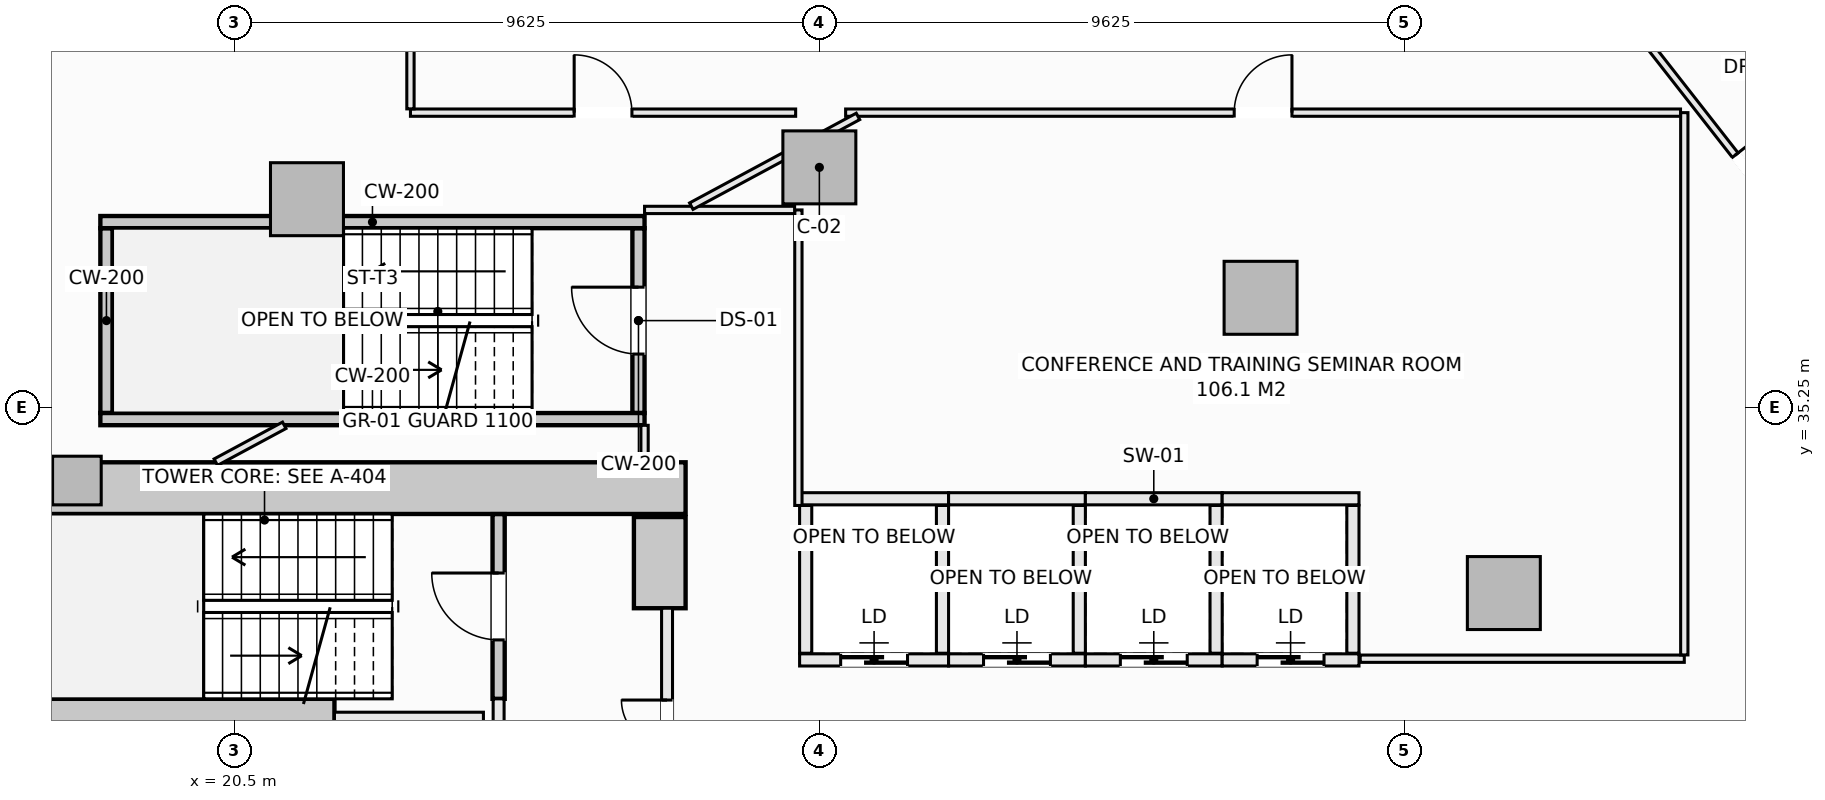
"""IFC4 building model, lengths in metres.
Left out: names, types, materials, properties, quantities, classifications, styles, units other than length and angle.
Written with IfcOpenShell. Run it as: python <this file> out.ifc"""

import sys

from ifc_helpers import new_model, si_unit, direction, frame, frame_2d, origin, origin_2d, place, context, subcontext, project, spatial, rectangle, extrude, element, fill, save


model = new_model("IFC4")
c1 = context("Model", 3, precision=1e-05, world=origin(), true_north=direction((0.0, 1.0)))
c2 = subcontext(c1, "Body", "Model", "MODEL_VIEW")
j1 = project(units=[si_unit("LENGTHUNIT", "METRE"), si_unit("PLANEANGLEUNIT", "RADIAN")], contexts=[c1])
p1 = place(None, origin())
s1 = spatial("IfcSite", under=j1, at=p1, CompositionType="ELEMENT")
p2 = place(p1, origin())
s2 = spatial("IfcBuilding", under=s1, at=p2, CompositionType="ELEMENT")
p3 = place(p2, frame((0.0, 0.0, 38.05)))
s3 = spatial("IfcBuildingStorey", under=s2, at=p3, CompositionType="ELEMENT", Elevation=38.05)
p4 = place(p3, frame((14.075, 33.925, -0.28), z_axis=(0.0, 0.0, 1.0), x_axis=(1.0, 0.0, 0.0)))
e1 = element("IfcWall", 1, at=p4, inside=s3, PredefinedType="SHEAR", context=c2, shape_type="SweptSolid", body=[
    extrude(rectangle(XDim=13.85, YDim=0.85, at=frame_2d((6.925, 0.0))), origin(), (0.0, 0.0, 1.0), 3.85),
])
p5 = place(p3, frame((27.5, 31.95, -0.28), z_axis=(0.0, 0.0, 1.0), x_axis=(0.0, 1.0, 0.0)))
e2 = element("IfcWall", 2, at=p5, inside=s3, PredefinedType="SHEAR", context=c2, shape_type="SweptSolid", body=[
    extrude(rectangle(XDim=1.5, YDim=0.85, at=frame_2d((0.75, 0.0))), origin(), (0.0, 0.0, 1.0), 3.85),
])
p6 = place(p3, frame((14.85, 30.25, -0.28), z_axis=(0.0, 0.0, 1.0), x_axis=(1.0, 0.0, 0.0)))
e3 = element("IfcWall", 3, at=p6, inside=s3, PredefinedType="SHEAR", context=c2, shape_type="SweptSolid", body=[
    extrude(rectangle(XDim=7.3, YDim=0.42, at=frame_2d((3.65, 0.0))), origin(), (0.0, 0.0, 1.0), 3.85),
])
for number, where, z_axis, x_axis in (
    (4, (41.382, 32.199, -0.28), (0.0, 0.0, 1.0), (1.0, 0.0, 0.0)),
    (5, (37.382, 37.055, -0.28), (0.0, 0.0, 1.0), (1.0, 0.0, 0.0)),
    (6, (30.125, 39.2, -0.28), (0.0, 0.0, 1.0), (1.0, 0.0, 0.0)),
    (7, (21.698, 38.677, -0.28), (0.0, 0.0, 1.0), (1.0, 0.0, 0.0)),
):
    element("IfcColumn", number, at=place(p3, frame(where, z_axis=z_axis, x_axis=x_axis)), inside=s3, PredefinedType="COLUMN", context=c2, shape_type="SweptSolid", body=[
        extrude(rectangle(XDim=1.2, YDim=1.2, at=origin_2d()), origin(), (0.0, 0.0, 1.0), 3.85),
    ])
p7 = place(p3, frame((17.914, 34.05, -0.28), z_axis=(0.0, 0.0, 1.0), x_axis=(1.0, 0.0, 0.0)))
e8 = element("IfcColumn", 8, at=p7, inside=s3, PredefinedType="PILASTER", context=c2, shape_type="SweptSolid", body=[
    extrude(rectangle(XDim=0.8, YDim=0.8, at=origin_2d()), origin(), (0.0, 0.0, 1.0), 3.85),
])
p8 = place(p3, frame((24.85, 30.46, -0.28), z_axis=(0.0, 0.0, 1.0), x_axis=(0.0, 1.0, 0.0)))
e9 = element("IfcWall", 9, at=p8, inside=s3, PredefinedType="SHEAR", context=c2, shape_type="SweptSolid", body=[
    extrude(rectangle(XDim=3.038, YDim=0.2, at=frame_2d((1.519, 0.0))), origin(), (0.0, 0.0, 1.0), 3.85),
])
p9 = place(p8, frame((0.969, 0.0, 0.28)))
e10 = element("IfcOpeningElement", 10, at=p9, cuts=e9, PredefinedType="OPENING", context=c2, shape_type="SweptSolid", body=[
    extrude(rectangle(XDim=1.1, YDim=2.15, at=frame_2d((0.55, 1.075))), frame((0.0, 0.11, 0.0), z_axis=(0.0, -1.0, 0.0), x_axis=(1.0, 0.0, 0.0)), (0.0, 0.0, 1.0), 0.22),
])
p10 = place(p3, frame((27.15, 35.16, -0.28), z_axis=(0.0, 0.0, 1.0), x_axis=(0.0, 1.0, 0.0)))
e11 = element("IfcWall", 11, at=p10, inside=s3, PredefinedType="SHEAR", context=c2, shape_type="SweptSolid", body=[
    extrude(rectangle(XDim=3.04, YDim=0.2, at=frame_2d((1.52, 0.0))), origin(), (0.0, 0.0, 1.0), 3.85),
])
p11 = place(p10, frame((0.97, 0.0, 0.28)))
e12 = element("IfcOpeningElement", 12, at=p11, cuts=e11, PredefinedType="OPENING", context=c2, shape_type="SweptSolid", body=[
    extrude(rectangle(XDim=1.1, YDim=2.15, at=frame_2d((0.55, 1.075))), frame((0.0, 0.11, 0.0), z_axis=(0.0, -1.0, 0.0), x_axis=(1.0, 0.0, 0.0)), (0.0, 0.0, 1.0), 0.22),
])
p12 = place(p3, frame((18.4, 35.16, -0.28), z_axis=(0.0, 0.0, 1.0), x_axis=(0.0, 1.0, 0.0)))
e13 = element("IfcWall", 13, at=p12, inside=s3, PredefinedType="SHEAR", context=c2, shape_type="SweptSolid", body=[
    extrude(rectangle(XDim=3.04, YDim=0.2, at=frame_2d((1.52, 0.0))), origin(), (0.0, 0.0, 1.0), 3.85),
])
for number, where, z_axis, x_axis in (
    (14, (18.3, 38.3, -0.28), (0.0, 0.0, 1.0), (1.0, 0.0, 0.0)),
    (15, (18.3, 35.06, -0.28), (0.0, 0.0, 1.0), (1.0, 0.0, 0.0)),
):
    element("IfcWall", number, at=place(p3, frame(where, z_axis=z_axis, x_axis=x_axis)), inside=s3, PredefinedType="SHEAR", context=c2, shape_type="SweptSolid", body=[
        extrude(rectangle(XDim=8.95, YDim=0.2, at=frame_2d((4.475, 0.0))), origin(), (0.0, 0.0, 1.0), 3.85),
    ])
p13 = place(p3, frame((22.15, 30.14, 0.0), z_axis=(0.0, 0.0, 1.0), x_axis=(1.0, 0.0, 0.0)))
e16 = element("IfcWall", 16, at=p13, inside=s3, PredefinedType="SOLIDWALL", context=c2, shape_type="SweptSolid", body=[
    extrude(rectangle(XDim=2.45, YDim=0.2, at=frame_2d((1.225, 0.0))), origin(), (0.0, 0.0, 1.0), 3.57),
])
p14 = place(p3, frame((29.8, 33.75, 0.0), z_axis=(0.0, 0.0, 1.0), x_axis=(1.0, 0.0, 0.0)))
e17 = element("IfcWall", 17, at=p14, inside=s3, PredefinedType="SOLIDWALL", context=c2, shape_type="SweptSolid", body=[
    extrude(rectangle(XDim=2.45, YDim=0.2, at=frame_2d((1.225, 0.0))), origin(), (0.0, 0.0, 1.0), 3.57),
])
p15 = place(p3, frame((29.8, 31.1, 0.0), z_axis=(0.0, 0.0, 1.0), x_axis=(1.0, 0.0, 0.0)))
e18 = element("IfcWall", 18, at=p15, inside=s3, PredefinedType="SOLIDWALL", context=c2, shape_type="SweptSolid", body=[
    extrude(rectangle(XDim=2.45, YDim=0.2, at=frame_2d((1.225, 0.0))), origin(), (0.0, 0.0, 1.0), 3.57),
])
p16 = place(p15, frame((0.675, 0.0, 0.0)))
e19 = element("IfcOpeningElement", 19, at=p16, cuts=e18, PredefinedType="OPENING", context=c2, shape_type="SweptSolid", body=[
    extrude(rectangle(XDim=1.1, YDim=2.2, at=frame_2d((0.55, 1.1))), frame((0.0, 0.11, 0.0), z_axis=(0.0, -1.0, 0.0), x_axis=(1.0, 0.0, 0.0)), (0.0, 0.0, 1.0), 0.22),
])
for number, where, z_axis, x_axis in (
    (20, (29.9, 31.21, 0.0), (0.0, 0.0, 1.0), (0.0, 1.0, 0.0)),
    (21, (32.15, 31.21, 0.0), (0.0, 0.0, 1.0), (0.0, 1.0, 0.0)),
):
    element("IfcWall", number, at=place(p3, frame(where, z_axis=z_axis, x_axis=x_axis)), inside=s3, PredefinedType="SOLIDWALL", context=c2, shape_type="SweptSolid", body=[
        extrude(rectangle(XDim=2.43, YDim=0.2, at=frame_2d((1.215, 0.0))), origin(), (0.0, 0.0, 1.0), 3.57),
    ])
p17 = place(p3, frame((32.25, 33.75, 0.0), z_axis=(0.0, 0.0, 1.0), x_axis=(1.0, 0.0, 0.0)))
e22 = element("IfcWall", 22, at=p17, inside=s3, PredefinedType="SOLIDWALL", context=c2, shape_type="SweptSolid", body=[
    extrude(rectangle(XDim=2.25, YDim=0.2, at=frame_2d((1.125, 0.0))), origin(), (0.0, 0.0, 1.0), 3.57),
])
p18 = place(p3, frame((32.25, 31.1, 0.0), z_axis=(0.0, 0.0, 1.0), x_axis=(1.0, 0.0, 0.0)))
e23 = element("IfcWall", 23, at=p18, inside=s3, PredefinedType="SOLIDWALL", context=c2, shape_type="SweptSolid", body=[
    extrude(rectangle(XDim=2.25, YDim=0.2, at=frame_2d((1.125, 0.0))), origin(), (0.0, 0.0, 1.0), 3.57),
])
p19 = place(p18, frame((0.575, 0.0, 0.0)))
e24 = element("IfcOpeningElement", 24, at=p19, cuts=e23, PredefinedType="OPENING", context=c2, shape_type="SweptSolid", body=[
    extrude(rectangle(XDim=1.1, YDim=2.2, at=frame_2d((0.55, 1.1))), frame((0.0, 0.11, 0.0), z_axis=(0.0, -1.0, 0.0), x_axis=(1.0, 0.0, 0.0)), (0.0, 0.0, 1.0), 0.22),
])
p20 = place(p3, frame((34.4, 31.21, 0.0), z_axis=(0.0, 0.0, 1.0), x_axis=(0.0, 1.0, 0.0)))
e25 = element("IfcWall", 25, at=p20, inside=s3, PredefinedType="SOLIDWALL", context=c2, shape_type="SweptSolid", body=[
    extrude(rectangle(XDim=2.43, YDim=0.2, at=frame_2d((1.215, 0.0))), origin(), (0.0, 0.0, 1.0), 3.57),
])
p21 = place(p3, frame((34.5, 33.75, 0.0), z_axis=(0.0, 0.0, 1.0), x_axis=(1.0, 0.0, 0.0)))
e26 = element("IfcWall", 26, at=p21, inside=s3, PredefinedType="SOLIDWALL", context=c2, shape_type="SweptSolid", body=[
    extrude(rectangle(XDim=2.25, YDim=0.2, at=frame_2d((1.125, 0.0))), origin(), (0.0, 0.0, 1.0), 3.57),
])
p22 = place(p3, frame((34.5, 31.1, 0.0), z_axis=(0.0, 0.0, 1.0), x_axis=(1.0, 0.0, 0.0)))
e27 = element("IfcWall", 27, at=p22, inside=s3, PredefinedType="SOLIDWALL", context=c2, shape_type="SweptSolid", body=[
    extrude(rectangle(XDim=2.25, YDim=0.2, at=frame_2d((1.125, 0.0))), origin(), (0.0, 0.0, 1.0), 3.57),
])
p23 = place(p22, frame((0.575, 0.0, 0.0)))
e28 = element("IfcOpeningElement", 28, at=p23, cuts=e27, PredefinedType="OPENING", context=c2, shape_type="SweptSolid", body=[
    extrude(rectangle(XDim=1.1, YDim=2.2, at=frame_2d((0.55, 1.1))), frame((0.0, 0.11, 0.0), z_axis=(0.0, -1.0, 0.0), x_axis=(1.0, 0.0, 0.0)), (0.0, 0.0, 1.0), 0.22),
])
p24 = place(p3, frame((36.65, 31.21, 0.0), z_axis=(0.0, 0.0, 1.0), x_axis=(0.0, 1.0, 0.0)))
e29 = element("IfcWall", 29, at=p24, inside=s3, PredefinedType="SOLIDWALL", context=c2, shape_type="SweptSolid", body=[
    extrude(rectangle(XDim=2.43, YDim=0.2, at=frame_2d((1.215, 0.0))), origin(), (0.0, 0.0, 1.0), 3.57),
])
p25 = place(p3, frame((36.75, 33.75, 0.0), z_axis=(0.0, 0.0, 1.0), x_axis=(1.0, 0.0, 0.0)))
e30 = element("IfcWall", 30, at=p25, inside=s3, PredefinedType="SOLIDWALL", context=c2, shape_type="SweptSolid", body=[
    extrude(rectangle(XDim=2.25, YDim=0.2, at=frame_2d((1.125, 0.0))), origin(), (0.0, 0.0, 1.0), 3.57),
])
p26 = place(p3, frame((36.75, 31.1, 0.0), z_axis=(0.0, 0.0, 1.0), x_axis=(1.0, 0.0, 0.0)))
e31 = element("IfcWall", 31, at=p26, inside=s3, PredefinedType="SOLIDWALL", context=c2, shape_type="SweptSolid", body=[
    extrude(rectangle(XDim=2.25, YDim=0.2, at=frame_2d((1.125, 0.0))), origin(), (0.0, 0.0, 1.0), 3.57),
])
p27 = place(p26, frame((0.575, 0.0, 0.0)))
e32 = element("IfcOpeningElement", 32, at=p27, cuts=e31, PredefinedType="OPENING", context=c2, shape_type="SweptSolid", body=[
    extrude(rectangle(XDim=1.1, YDim=2.2, at=frame_2d((0.55, 1.1))), frame((0.0, 0.11, 0.0), z_axis=(0.0, -1.0, 0.0), x_axis=(1.0, 0.0, 0.0)), (0.0, 0.0, 1.0), 0.22),
])
p28 = place(p3, frame((38.9, 31.21, 0.0), z_axis=(0.0, 0.0, 1.0), x_axis=(0.0, 1.0, 0.0)))
e33 = element("IfcWall", 33, at=p28, inside=s3, PredefinedType="SOLIDWALL", context=c2, shape_type="SweptSolid", body=[
    extrude(rectangle(XDim=2.43, YDim=0.2, at=frame_2d((1.215, 0.0))), origin(), (0.0, 0.0, 1.0), 3.57),
])
p29 = place(p3, frame((24.85, 30.04, 0.0), z_axis=(0.0, 0.0, 1.0), x_axis=(0.0, 1.0, 0.0)))
e34 = element("IfcWall", 34, at=p29, inside=s3, PredefinedType="SOLIDWALL", context=c2, shape_type="SweptSolid", body=[
    extrude(rectangle(XDim=0.42, YDim=0.18, at=frame_2d((0.21, 0.0))), origin(), (0.0, 0.0, 1.0), 3.57),
])
p30 = place(p3, frame((27.62, 22.05, 0.0), z_axis=(0.0, 0.0, 1.0), x_axis=(0.0, 1.0, 0.0)))
e35 = element("IfcWall", 35, at=p30, inside=s3, PredefinedType="SOLIDWALL", context=c2, shape_type="SweptSolid", body=[
    extrude(rectangle(XDim=9.9, YDim=0.18, at=frame_2d((4.95, 0.0))), origin(), (0.0, 0.0, 1.0), 2.662),
])
p31 = place(p30, frame((4.475, 0.0, 0.0)))
e36 = element("IfcOpeningElement", 36, at=p31, cuts=e35, PredefinedType="OPENING", context=c2, shape_type="SweptSolid", body=[
    extrude(rectangle(XDim=0.95, YDim=2.1, at=frame_2d((0.475, 1.05))), frame((0.0, 0.1, 0.0), z_axis=(0.0, -1.0, 0.0), x_axis=(1.0, 0.0, 0.0)), (0.0, 0.0, 1.0), 0.2),
])
p32 = place(p30, frame((6.89, 0.0, 0.0)))
e37 = element("IfcOpeningElement", 37, at=p32, cuts=e35, PredefinedType="OPENING", context=c2, shape_type="SweptSolid", body=[
    extrude(rectangle(XDim=1.5, YDim=2.2, at=frame_2d((0.75, 1.1))), frame((0.0, 0.1, 0.0), z_axis=(0.0, -1.0, 0.0), x_axis=(1.0, 0.0, 0.0)), (0.0, 0.0, 1.0), 0.2),
])
p33 = place(p30, frame((1.51, 0.0, 0.0)))
e38 = element("IfcOpeningElement", 38, at=p33, cuts=e35, PredefinedType="OPENING", context=c2, shape_type="SweptSolid", body=[
    extrude(rectangle(XDim=1.5, YDim=2.2, at=frame_2d((0.75, 1.1))), frame((0.0, 0.1, 0.0), z_axis=(0.0, -1.0, 0.0), x_axis=(1.0, 0.0, 0.0)), (0.0, 0.0, 1.0), 0.2),
])
p34 = place(p3, frame((29.78, 33.64, 0.0), z_axis=(0.0, 0.0, 1.0), x_axis=(0.0, 1.0, 0.0)))
e39 = element("IfcWall", 39, at=p34, inside=s3, PredefinedType="PARTITIONING", context=c2, shape_type="SweptSolid", body=[
    extrude(rectangle(XDim=4.86, YDim=0.12, at=frame_2d((2.43, 0.0))), origin(), (0.0, 0.0, 1.0), 3.57),
])
p35 = place(p3, frame((39.02, 31.12, 0.0), z_axis=(0.0, 0.0, 1.0), x_axis=(1.0, 0.0, 0.0)))
e40 = element("IfcWall", 40, at=p35, inside=s3, PredefinedType="PARTITIONING", context=c2, shape_type="SweptSolid", body=[
    extrude(rectangle(XDim=5.33, YDim=0.12, at=frame_2d((2.665, 0.0))), origin(), (0.0, 0.0, 1.0), 3.57),
])
p36 = place(p3, frame((44.35, 31.182, 0.0), z_axis=(0.0, 0.0, 1.0), x_axis=(0.0, 1.0, 0.0)))
e41 = element("IfcWall", 41, at=p36, inside=s3, PredefinedType="PARTITIONING", context=c2, shape_type="SweptSolid", body=[
    extrude(rectangle(XDim=8.918, YDim=0.12, at=frame_2d((4.459, 0.0))), origin(), (0.0, 0.0, 1.0), 3.57),
])
p37 = place(p3, frame((23.4, 40.1, 0.0), z_axis=(0.0, 0.0, 1.0), x_axis=(1.0, 0.0, 0.0)))
e42 = element("IfcWall", 42, at=p37, inside=s3, PredefinedType="PARTITIONING", context=c2, shape_type="SweptSolid", body=[
    extrude(rectangle(XDim=6.335, YDim=0.12, at=frame_2d((3.167, 0.0))), origin(), (0.0, 0.0, 1.0), 3.57),
])
p38 = place(p37, frame((2.692, 0.0, 0.0)))
e43 = element("IfcOpeningElement", 43, at=p38, cuts=e42, PredefinedType="OPENING", context=c2, shape_type="SweptSolid", body=[
    extrude(rectangle(XDim=0.95, YDim=2.1, at=frame_2d((0.475, 1.05))), frame((0.0, 0.07, 0.0), z_axis=(0.0, -1.0, 0.0), x_axis=(1.0, 0.0, 0.0)), (0.0, 0.0, 1.0), 0.14),
])
p39 = place(p3, frame((30.557, 40.1, 0.0), z_axis=(0.0, 0.0, 1.0), x_axis=(1.0, 0.0, 0.0)))
e44 = element("IfcWall", 44, at=p39, inside=s3, PredefinedType="PARTITIONING", context=c2, shape_type="SweptSolid", body=[
    extrude(rectangle(XDim=13.731, YDim=0.12, at=frame_2d((6.866, 0.0))), origin(), (0.0, 0.0, 1.0), 3.57),
])
p40 = place(p39, frame((6.39, 0.0, 0.0)))
e45 = element("IfcOpeningElement", 45, at=p40, cuts=e44, PredefinedType="OPENING", context=c2, shape_type="SweptSolid", body=[
    extrude(rectangle(XDim=0.95, YDim=2.1, at=frame_2d((0.475, 1.05))), frame((0.0, 0.07, 0.0), z_axis=(0.0, -1.0, 0.0), x_axis=(1.0, 0.0, 0.0)), (0.0, 0.0, 1.0), 0.14),
])
p41 = place(p3, frame((23.4, 40.162, 0.0), z_axis=(0.0, 0.0, 1.0), x_axis=(0.0, 1.0, 0.0)))
e46 = element("IfcWall", 46, at=p41, inside=s3, PredefinedType="PARTITIONING", context=c2, shape_type="SweptSolid", body=[
    extrude(rectangle(XDim=1.886, YDim=0.12, at=frame_2d((0.943, 0.0))), origin(), (0.0, 0.0, 1.0), 3.57),
])
p42 = place(p3, frame((43.137, 42.02, 0.0), z_axis=(0.0, 0.0, 1.0), x_axis=(0.616441660183, -0.787400583941, 0.0)))
e47 = element("IfcWall", 47, at=p42, inside=s3, PredefinedType="PARTITIONING", context=c2, shape_type="SweptSolid", body=[
    extrude(rectangle(XDim=5.083, YDim=0.12, at=frame_2d((2.541, 0.0))), origin(), (0.0, 0.0, 1.0), 3.57),
])
p43 = place(p42, frame((3.326, 0.0, 0.0)))
e48 = element("IfcOpeningElement", 48, at=p43, cuts=e47, PredefinedType="OPENING", context=c2, shape_type="SweptSolid", body=[
    extrude(rectangle(XDim=0.95, YDim=2.1, at=frame_2d((0.475, 1.05))), frame((0.0, 0.07, 0.0), z_axis=(0.0, -1.0, 0.0), x_axis=(1.0, 0.0, 0.0)), (0.0, 0.0, 1.0), 0.14),
])
p44 = place(p3, frame((27.25, 34.352, 0.0), z_axis=(0.0, 0.0, 1.0), x_axis=(0.0, 1.0, 0.0)))
e49 = element("IfcWall", 49, at=p44, inside=s3, PredefinedType="PARTITIONING", context=c2, shape_type="SweptSolid", body=[
    extrude(rectangle(XDim=0.606, YDim=0.12, at=frame_2d((0.303, 0.0))), origin(), (0.0, 0.0, 1.0), 3.57),
])
p45 = place(p3, frame((27.25, 38.5, 0.0), z_axis=(0.0, 0.0, 1.0), x_axis=(1.0, 0.0, 0.0)))
e50 = element("IfcWall", 50, at=p45, inside=s3, PredefinedType="PARTITIONING", context=c2, shape_type="SweptSolid", body=[
    extrude(rectangle(XDim=2.468, YDim=0.12, at=frame_2d((1.234, 0.0))), origin(), (0.0, 0.0, 1.0), 3.57),
])
p46 = place(p3, frame((20.199, 34.352, 0.0), z_axis=(0.0, 0.0, 1.0), x_axis=(0.880495630453, 0.474054263511, 0.0)))
e51 = element("IfcWall", 51, at=p46, inside=s3, PredefinedType="PARTITIONING", context=c2, shape_type="SweptSolid", body=[
    extrude(rectangle(XDim=1.278, YDim=0.12, at=frame_2d((0.639, 0.0))), origin(), (0.0, 0.0, 1.0), 3.57),
])
p47 = place(p3, frame((28.019, 38.562, 0.0), z_axis=(0.0, 0.0, 1.0), x_axis=(0.880483688628, 0.474076443267, 0.0)))
e52 = element("IfcWall", 52, at=p47, inside=s3, PredefinedType="PARTITIONING", context=c2, shape_type="SweptSolid", body=[
    extrude(rectangle(XDim=3.114, YDim=0.12, at=frame_2d((1.557, 0.0))), origin(), (0.0, 0.0, 1.0), 2.934),
])
p48 = place(p9, origin())
e53 = element("IfcDoor", 53, at=p48, inside=s3, OperationType="SINGLE_SWING_RIGHT", PredefinedType="DOOR", context=c2, shape_type="SweptSolid", body=[
    extrude(rectangle(XDim=1.1, YDim=2.15, at=frame_2d((0.55, 1.075))), frame((0.0, 0.025, 0.0), z_axis=(0.0, -1.0, 0.0), x_axis=(1.0, 0.0, 0.0)), (0.0, 0.0, 1.0), 0.05),
])
fill(e10, e53)
p49 = place(p11, origin())
e54 = element("IfcDoor", 54, at=p49, inside=s3, OperationType="SINGLE_SWING_RIGHT", PredefinedType="DOOR", context=c2, shape_type="SweptSolid", body=[
    extrude(rectangle(XDim=1.1, YDim=2.15, at=frame_2d((0.55, 1.075))), frame((0.0, 0.025, 0.0), z_axis=(0.0, -1.0, 0.0), x_axis=(1.0, 0.0, 0.0)), (0.0, 0.0, 1.0), 0.05),
])
fill(e12, e54)
p50 = place(p16, origin())
e55 = element("IfcDoor", 55, at=p50, inside=s3, OperationType="SLIDING_TO_LEFT", PredefinedType="DOOR", context=c2, shape_type="SweptSolid", body=[
    extrude(rectangle(XDim=1.1, YDim=2.2, at=frame_2d((0.55, 1.1))), frame((0.0, 0.025, 0.0), z_axis=(0.0, -1.0, 0.0), x_axis=(1.0, 0.0, 0.0)), (0.0, 0.0, 1.0), 0.05),
])
fill(e19, e55)
p51 = place(p19, origin())
e56 = element("IfcDoor", 56, at=p51, inside=s3, OperationType="SLIDING_TO_LEFT", PredefinedType="DOOR", context=c2, shape_type="SweptSolid", body=[
    extrude(rectangle(XDim=1.1, YDim=2.2, at=frame_2d((0.55, 1.1))), frame((0.0, 0.025, 0.0), z_axis=(0.0, -1.0, 0.0), x_axis=(1.0, 0.0, 0.0)), (0.0, 0.0, 1.0), 0.05),
])
fill(e24, e56)
p52 = place(p23, origin())
e57 = element("IfcDoor", 57, at=p52, inside=s3, OperationType="SLIDING_TO_LEFT", PredefinedType="DOOR", context=c2, shape_type="SweptSolid", body=[
    extrude(rectangle(XDim=1.1, YDim=2.2, at=frame_2d((0.55, 1.1))), frame((0.0, 0.025, 0.0), z_axis=(0.0, -1.0, 0.0), x_axis=(1.0, 0.0, 0.0)), (0.0, 0.0, 1.0), 0.05),
])
fill(e28, e57)
p53 = place(p27, origin())
e58 = element("IfcDoor", 58, at=p53, inside=s3, OperationType="SLIDING_TO_LEFT", PredefinedType="DOOR", context=c2, shape_type="SweptSolid", body=[
    extrude(rectangle(XDim=1.1, YDim=2.2, at=frame_2d((0.55, 1.1))), frame((0.0, 0.025, 0.0), z_axis=(0.0, -1.0, 0.0), x_axis=(1.0, 0.0, 0.0)), (0.0, 0.0, 1.0), 0.05),
])
fill(e32, e58)
p54 = place(p32, origin())
e59 = element("IfcDoor", 59, at=p54, inside=s3, OperationType="DOUBLE_DOOR_SINGLE_SWING", PredefinedType="DOOR", context=c2, shape_type="SweptSolid", body=[
    extrude(rectangle(XDim=1.5, YDim=2.2, at=frame_2d((0.75, 1.1))), frame((0.0, 0.025, 0.0), z_axis=(0.0, -1.0, 0.0), x_axis=(1.0, 0.0, 0.0)), (0.0, 0.0, 1.0), 0.05),
])
fill(e37, e59)
p55 = place(p43, origin())
e60 = element("IfcDoor", 60, at=p55, inside=s3, OperationType="SINGLE_SWING_LEFT", PredefinedType="DOOR", context=c2, shape_type="SweptSolid", body=[
    extrude(rectangle(XDim=0.95, YDim=2.1, at=frame_2d((0.475, 1.05))), frame((0.0, 0.025, 0.0), z_axis=(0.0, -1.0, 0.0), x_axis=(1.0, 0.0, 0.0)), (0.0, 0.0, 1.0), 0.05),
])
fill(e48, e60)
p56 = place(p40, origin())
e61 = element("IfcDoor", 61, at=p56, inside=s3, OperationType="SINGLE_SWING_RIGHT", PredefinedType="DOOR", context=c2, shape_type="SweptSolid", body=[
    extrude(rectangle(XDim=0.95, YDim=2.1, at=frame_2d((0.475, 1.05))), frame((0.0, 0.025, 0.0), z_axis=(0.0, -1.0, 0.0), x_axis=(1.0, 0.0, 0.0)), (0.0, 0.0, 1.0), 0.05),
])
fill(e45, e61)
p57 = place(p38, origin())
e62 = element("IfcDoor", 62, at=p57, inside=s3, OperationType="SINGLE_SWING_LEFT", PredefinedType="DOOR", context=c2, shape_type="SweptSolid", body=[
    extrude(rectangle(XDim=0.95, YDim=2.1, at=frame_2d((0.475, 1.05))), frame((0.0, 0.025, 0.0), z_axis=(0.0, -1.0, 0.0), x_axis=(1.0, 0.0, 0.0)), (0.0, 0.0, 1.0), 0.05),
])
fill(e43, e62)
save(model, sys.argv[1])
